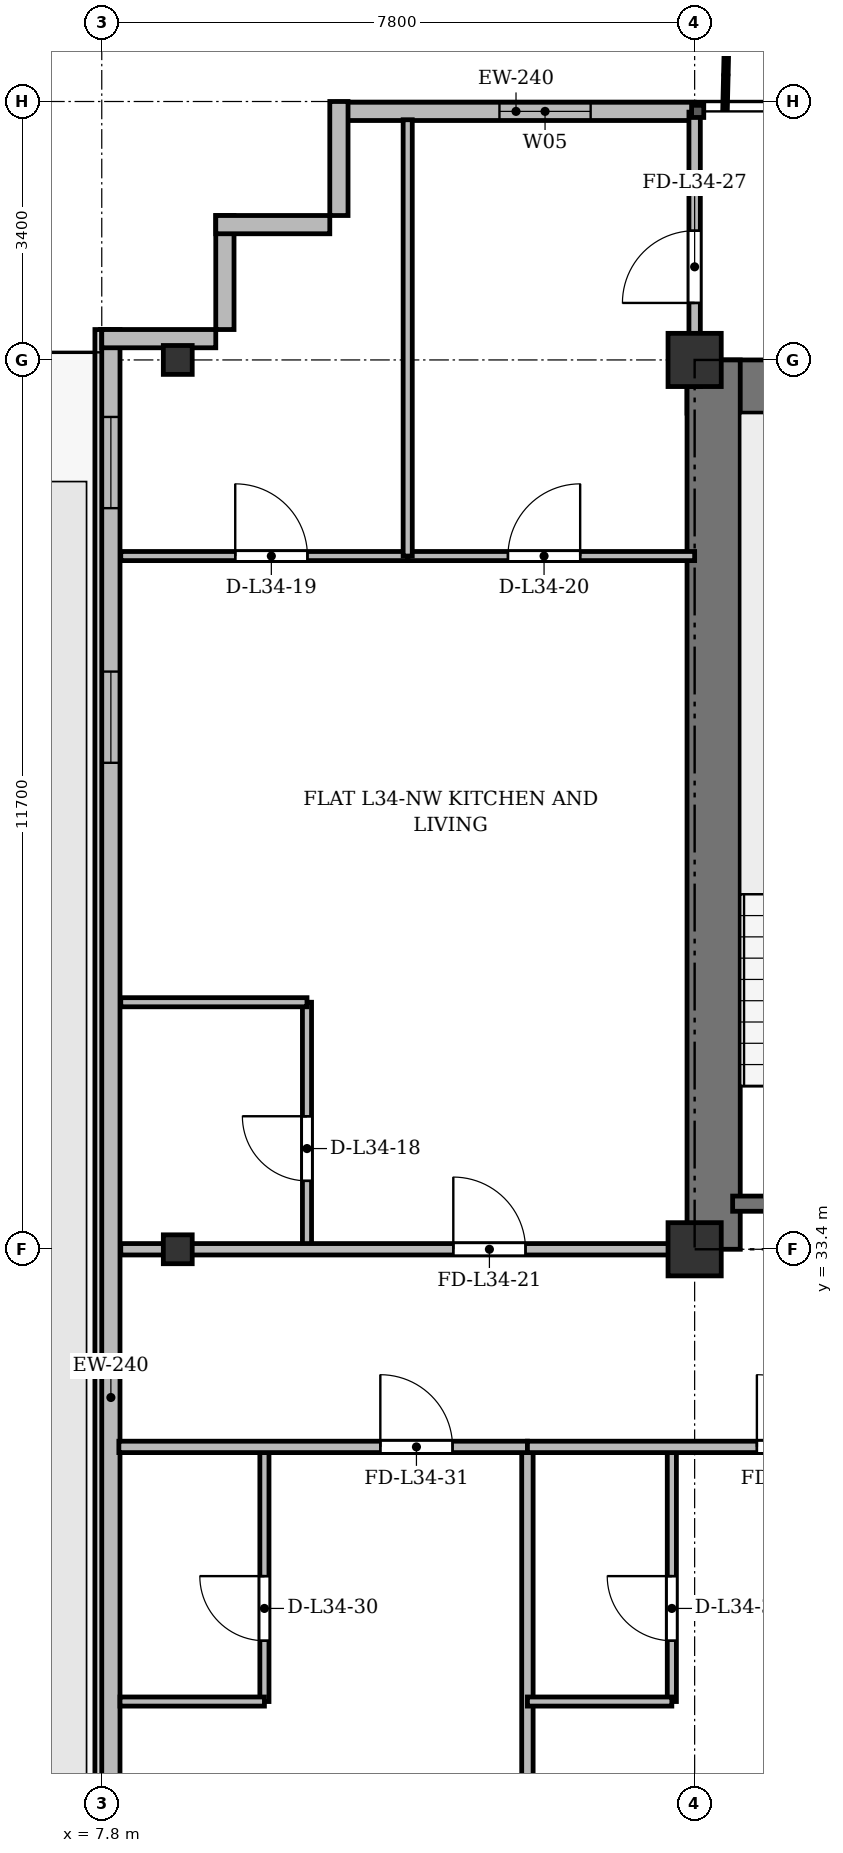
"""IFC4 building model, lengths in metres.
Left out: names, types, materials, properties, quantities, classifications, styles, units other than length and angle.
Written with IfcOpenShell. Run it as: python <this file> out.ifc"""

import sys

from ifc_helpers import new_model, si_unit, direction, frame, frame_2d, origin, origin_2d, place, context, subcontext, project, spatial, rectangle, i_section, extrude, source, transform, mapped, element, fill, save


model = new_model("IFC4")
c1 = context("Model", 3, precision=1e-05, world=origin(), true_north=direction((0.0, 1.0)))
c2 = subcontext(c1, "Body", "Model", "MODEL_VIEW")
j1 = project(units=[si_unit("LENGTHUNIT", "METRE"), si_unit("PLANEANGLEUNIT", "RADIAN")], contexts=[c1])
p1 = place(None, origin())
s1 = spatial("IfcSite", under=j1, at=p1, CompositionType="ELEMENT")
p2 = place(p1, origin())
s2 = spatial("IfcBuilding", under=s1, at=p2, CompositionType="ELEMENT")
p3 = place(p2, frame((0.0, 0.0, 132.1)))
s3 = spatial("IfcBuildingStorey", under=s2, at=p3, CompositionType="ELEMENT", Elevation=132.1)
m1 = source(origin(), c2, "Body", "SweptSolid", [
    extrude(i_section(OverallWidth=0.38, OverallDepth=0.38, WebThickness=0.02, FlangeThickness=0.03, at=origin_2d()), origin(), (0.0, 0.0, 1.0), 3.6),
])
for number, where, z_axis, x_axis in (
    (1, (8.8, 33.4, 0.0), (0.0, 0.0, 1.0), (1.0, 0.0, 0.0)),
    (2, (8.8, 45.1, 0.0), (0.0, 0.0, 1.0), (1.0, 0.0, 0.0)),
):
    element("IfcColumn", number, at=place(p3, frame(where, z_axis=z_axis, x_axis=x_axis)), inside=s3, PredefinedType="COLUMN", context=c2, shape_type="MappedRepresentation", body=[
        mapped(m1, transform((0.0, 0.0, 0.0), x_axis=(1.0, 0.0, 0.0), y_axis=(0.0, 1.0, 0.0), z_axis=(0.0, 0.0, 1.0), scale=1.0)),
    ])
m2 = source(origin(), c2, "Body", "SweptSolid", [
    extrude(rectangle(XDim=0.7, YDim=0.7, at=origin_2d()), origin(), (0.0, 0.0, 1.0), 3.6),
])
for number, where, z_axis, x_axis in (
    (3, (15.6, 33.4, 0.0), (0.0, 0.0, 1.0), (1.0, 0.0, 0.0)),
    (4, (15.6, 45.1, 0.0), (0.0, 0.0, 1.0), (1.0, 0.0, 0.0)),
):
    element("IfcColumn", number, at=place(p3, frame(where, z_axis=z_axis, x_axis=x_axis)), inside=s3, PredefinedType="COLUMN", context=c2, shape_type="MappedRepresentation", body=[
        mapped(m2, transform((0.0, 0.0, 0.0), x_axis=(1.0, 0.0, 0.0), y_axis=(0.0, 1.0, 0.0), z_axis=(0.0, 0.0, 1.0), scale=1.0)),
    ])
p4 = place(p3, frame((10.9, 48.37, 0.0), z_axis=(0.0, 0.0, 1.0), x_axis=(1.0, 0.0, 0.0)))
e5 = element("IfcWall", 5, at=p4, inside=s3, PredefinedType="SOLIDWALL", context=c2, shape_type="SweptSolid", body=[
    extrude(rectangle(XDim=4.7, YDim=0.24, at=frame_2d((2.35, 0.0))), origin(), (0.0, 0.0, 1.0), 3.35),
])
p5 = place(p4, frame((2.132, 0.0, 0.9)))
e6 = element("IfcOpeningElement", 6, at=p5, cuts=e5, PredefinedType="OPENING", context=c2, shape_type="SweptSolid", body=[
    extrude(rectangle(XDim=1.2, YDim=1.65, at=frame_2d((0.6, 0.825))), frame((0.0, 0.13, 0.0), z_axis=(0.0, -1.0, 0.0), x_axis=(1.0, 0.0, 0.0)), (0.0, 0.0, 1.0), 0.26),
])
p6 = place(p3, frame((7.92, 6.3, 0.0), z_axis=(0.0, 0.0, 1.0), x_axis=(0.0, 1.0, 0.0)))
e7 = element("IfcWall", 7, at=p6, inside=s3, PredefinedType="SOLIDWALL", context=c2, shape_type="SweptSolid", body=[
    extrude(rectangle(XDim=39.2, YDim=0.24, at=frame_2d((19.6, 0.0))), origin(), (0.0, 0.0, 1.0), 3.35),
])
p7 = place(p6, frame((9.6, 0.0, 0.0)))
e8 = element("IfcOpeningElement", 8, at=p7, cuts=e7, PredefinedType="OPENING", context=c2, shape_type="SweptSolid", body=[
    extrude(rectangle(XDim=1.2, YDim=2.2, at=frame_2d((0.6, 1.1))), frame((0.0, 0.13, 0.0), z_axis=(0.0, -1.0, 0.0), x_axis=(1.0, 0.0, 0.0)), (0.0, 0.0, 1.0), 0.26),
])
p8 = place(p6, frame((1.45, 0.0, 0.92)))
e9 = element("IfcOpeningElement", 9, at=p8, cuts=e7, PredefinedType="OPENING", context=c2, shape_type="SweptSolid", body=[
    extrude(rectangle(XDim=1.2, YDim=1.65, at=frame_2d((0.6, 0.825))), frame((0.0, 0.13, 0.0), z_axis=(0.0, -1.0, 0.0), x_axis=(1.0, 0.0, 0.0)), (0.0, 0.0, 1.0), 0.26),
])
p9 = place(p6, frame((3.8, 0.0, 0.92)))
e10 = element("IfcOpeningElement", 10, at=p9, cuts=e7, PredefinedType="OPENING", context=c2, shape_type="SweptSolid", body=[
    extrude(rectangle(XDim=2.6, YDim=1.9, at=frame_2d((1.3, 0.95))), frame((0.0, 0.13, 0.0), z_axis=(0.0, -1.0, 0.0), x_axis=(1.0, 0.0, 0.0)), (0.0, 0.0, 1.0), 0.26),
])
p10 = place(p6, frame((15.2, 0.0, 0.92)))
e11 = element("IfcOpeningElement", 11, at=p10, cuts=e7, PredefinedType="OPENING", context=c2, shape_type="SweptSolid", body=[
    extrude(rectangle(XDim=2.6, YDim=1.9, at=frame_2d((1.3, 0.95))), frame((0.0, 0.13, 0.0), z_axis=(0.0, -1.0, 0.0), x_axis=(1.0, 0.0, 0.0)), (0.0, 0.0, 1.0), 0.26),
])
p11 = place(p6, frame((33.5, 0.0, 0.92)))
e12 = element("IfcOpeningElement", 12, at=p11, cuts=e7, PredefinedType="OPENING", context=c2, shape_type="SweptSolid", body=[
    extrude(rectangle(XDim=1.2, YDim=1.65, at=frame_2d((0.6, 0.825))), frame((0.0, 0.13, 0.0), z_axis=(0.0, -1.0, 0.0), x_axis=(1.0, 0.0, 0.0)), (0.0, 0.0, 1.0), 0.26),
])
p12 = place(p6, frame((36.85, 0.0, 0.92)))
e13 = element("IfcOpeningElement", 13, at=p12, cuts=e7, PredefinedType="OPENING", context=c2, shape_type="SweptSolid", body=[
    extrude(rectangle(XDim=1.2, YDim=1.65, at=frame_2d((0.6, 0.825))), frame((0.0, 0.13, 0.0), z_axis=(0.0, -1.0, 0.0), x_axis=(1.0, 0.0, 0.0)), (0.0, 0.0, 1.0), 0.26),
])
for number, where, z_axis, x_axis in (
    (14, (7.8, 45.38, 0.0), (0.0, 0.0, 1.0), (1.0, 0.0, 0.0)),
    (15, (9.42, 45.5, 0.0), (0.0, 0.0, 1.0), (0.0, 1.0, 0.0)),
    (16, (9.3, 46.88, 0.0), (0.0, 0.0, 1.0), (1.0, 0.0, 0.0)),
    (17, (10.92, 47.0, 0.0), (0.0, 0.0, 1.0), (0.0, 1.0, 0.0)),
):
    element("IfcWall", number, at=place(p3, frame(where, z_axis=z_axis, x_axis=x_axis)), inside=s3, PredefinedType="SOLIDWALL", context=c2, shape_type="SweptSolid", body=[
        extrude(rectangle(XDim=1.5, YDim=0.24, at=frame_2d((0.75, 0.0))), origin(), (0.0, 0.0, 1.0), 3.35),
    ])
p13 = place(p3, frame((15.5, 44.75, 0.0), z_axis=(0.0, 0.0, 1.0), x_axis=(1.0, 0.0, 0.0)))
e18 = element("IfcWall", 18, at=p13, inside=s3, PredefinedType="SHEAR", context=c2, shape_type="SweptSolid", body=[
    extrude(rectangle(XDim=43.4, YDim=0.7, at=frame_2d((21.7, 0.0))), origin(), (0.0, 0.0, 1.0), 3.35),
])
p14 = place(p3, frame((15.85, 33.4, 0.0), z_axis=(0.0, 0.0, 1.0), x_axis=(0.0, 1.0, 0.0)))
e19 = element("IfcWall", 19, at=p14, inside=s3, PredefinedType="SHEAR", context=c2, shape_type="SweptSolid", body=[
    extrude(rectangle(XDim=11.7, YDim=0.7, at=frame_2d((5.85, 0.0))), origin(), (0.0, 0.0, 1.0), 3.35),
])
p15 = place(p3, frame((16.1, 34.0, 0.0), z_axis=(0.0, 0.0, 1.0), x_axis=(1.0, 0.0, 0.0)))
e20 = element("IfcWall", 20, at=p15, inside=s3, PredefinedType="SHEAR", context=c2, shape_type="SweptSolid", body=[
    extrude(rectangle(XDim=3.4, YDim=0.2, at=frame_2d((1.7, 0.0))), origin(), (0.0, 0.0, 1.0), 3.35),
])
p16 = place(p3, frame((10.5, 33.4, 0.0), z_axis=(0.0, 0.0, 1.0), x_axis=(0.0, 1.0, 0.0)))
e21 = element("IfcWall", 21, at=p16, inside=s3, PredefinedType="PARTITIONING", context=c2, shape_type="SweptSolid", body=[
    extrude(rectangle(XDim=3.25, YDim=0.12, at=frame_2d((1.625, 0.0))), origin(), (0.0, 0.0, 1.0), 2.75),
])
p17 = place(p16, frame((0.9, 0.0, 0.0)))
e22 = element("IfcOpeningElement", 22, at=p17, cuts=e21, PredefinedType="OPENING", context=c2, shape_type="SweptSolid", body=[
    extrude(rectangle(XDim=0.85, YDim=2.1, at=frame_2d((0.425, 1.05))), frame((0.0, 0.07, 0.0), z_axis=(0.0, -1.0, 0.0), x_axis=(1.0, 0.0, 0.0)), (0.0, 0.0, 1.0), 0.14),
])
p18 = place(p3, frame((8.05, 36.65, 0.0), z_axis=(0.0, 0.0, 1.0), x_axis=(1.0, 0.0, 0.0)))
e23 = element("IfcWall", 23, at=p18, inside=s3, PredefinedType="PARTITIONING", context=c2, shape_type="SweptSolid", body=[
    extrude(rectangle(XDim=2.45, YDim=0.12, at=frame_2d((1.225, 0.0))), origin(), (0.0, 0.0, 1.0), 2.85),
])
p19 = place(p3, frame((8.05, 42.52, 0.0), z_axis=(0.0, 0.0, 1.0), x_axis=(1.0, 0.0, 0.0)))
e24 = element("IfcWall", 24, at=p19, inside=s3, PredefinedType="PARTITIONING", context=c2, shape_type="SweptSolid", body=[
    extrude(rectangle(XDim=3.775, YDim=0.12, at=frame_2d((1.887, 0.0))), origin(), (0.0, 0.0, 1.0), 2.85),
])
p20 = place(p19, frame((1.506, 0.0, 0.0)))
e25 = element("IfcOpeningElement", 25, at=p20, cuts=e24, PredefinedType="OPENING", context=c2, shape_type="SweptSolid", body=[
    extrude(rectangle(XDim=0.95, YDim=2.15, at=frame_2d((0.475, 1.075))), frame((0.0, 0.07, 0.0), z_axis=(0.0, -1.0, 0.0), x_axis=(1.0, 0.0, 0.0)), (0.0, 0.0, 1.0), 0.14),
])
p21 = place(p3, frame((11.825, 42.52, 0.0), z_axis=(0.0, 0.0, 1.0), x_axis=(1.0, 0.0, 0.0)))
e26 = element("IfcWall", 26, at=p21, inside=s3, PredefinedType="PARTITIONING", context=c2, shape_type="SweptSolid", body=[
    extrude(rectangle(XDim=3.775, YDim=0.12, at=frame_2d((1.888, 0.0))), origin(), (0.0, 0.0, 1.0), 2.85),
])
p22 = place(p21, frame((1.319, 0.0, 0.0)))
e27 = element("IfcOpeningElement", 27, at=p22, cuts=e26, PredefinedType="OPENING", context=c2, shape_type="SweptSolid", body=[
    extrude(rectangle(XDim=0.95, YDim=2.15, at=frame_2d((0.475, 1.075))), frame((0.0, 0.07, 0.0), z_axis=(0.0, -1.0, 0.0), x_axis=(1.0, 0.0, 0.0)), (0.0, 0.0, 1.0), 0.14),
])
p23 = place(p3, frame((11.825, 42.52, 0.0), z_axis=(0.0, 0.0, 1.0), x_axis=(0.0, 1.0, 0.0)))
e28 = element("IfcWall", 28, at=p23, inside=s3, PredefinedType="PARTITIONING", context=c2, shape_type="SweptSolid", body=[
    extrude(rectangle(XDim=5.74, YDim=0.12, at=frame_2d((2.87, 0.0))), origin(), (0.0, 0.0, 1.0), 2.75),
])
p24 = place(p3, frame((8.05, 33.4, 0.0), z_axis=(0.0, 0.0, 1.0), x_axis=(1.0, 0.0, 0.0)))
e29 = element("IfcWall", 29, at=p24, inside=s3, PredefinedType="PARTITIONING", context=c2, shape_type="SweptSolid", body=[
    extrude(rectangle(XDim=7.55, YDim=0.15, at=frame_2d((3.775, 0.0))), origin(), (0.0, 0.0, 1.0), 2.75),
])
p25 = place(p24, frame((4.375, 0.0, 0.0)))
e30 = element("IfcOpeningElement", 30, at=p25, cuts=e29, PredefinedType="OPENING", context=c2, shape_type="SweptSolid", body=[
    extrude(rectangle(XDim=0.95, YDim=2.15, at=frame_2d((0.475, 1.075))), frame((0.0, 0.085, 0.0), z_axis=(0.0, -1.0, 0.0), x_axis=(1.0, 0.0, 0.0)), (0.0, 0.0, 1.0), 0.17),
])
p26 = place(p3, frame((15.6, 44.75, 0.0), z_axis=(0.0, 0.0, 1.0), x_axis=(0.0, 1.0, 0.0)))
e31 = element("IfcWall", 31, at=p26, inside=s3, PredefinedType="PARTITIONING", context=c2, shape_type="SweptSolid", body=[
    extrude(rectangle(XDim=3.61, YDim=0.15, at=frame_2d((1.805, 0.0))), origin(), (0.0, 0.0, 1.0), 2.85),
])
p27 = place(p26, frame((1.1, 0.0, 0.0)))
e32 = element("IfcOpeningElement", 32, at=p27, cuts=e31, PredefinedType="OPENING", context=c2, shape_type="SweptSolid", body=[
    extrude(rectangle(XDim=0.95, YDim=2.15, at=frame_2d((0.475, 1.075))), frame((0.0, 0.085, 0.0), z_axis=(0.0, -1.0, 0.0), x_axis=(1.0, 0.0, 0.0)), (0.0, 0.0, 1.0), 0.17),
])
p28 = place(p3, frame((13.4, 3.525, 0.0), z_axis=(0.0, 0.0, 1.0), x_axis=(0.0, 1.0, 0.0)))
e33 = element("IfcWall", 33, at=p28, inside=s3, PredefinedType="PARTITIONING", context=c2, shape_type="SweptSolid", body=[
    extrude(rectangle(XDim=27.275, YDim=0.15, at=frame_2d((13.638, 0.0))), origin(), (0.0, 0.0, 1.0), 2.75),
])
p29 = place(p3, frame((9.94, 27.45, 0.0), z_axis=(0.0, 0.0, 1.0), x_axis=(0.0, 1.0, 0.0)))
e34 = element("IfcWall", 34, at=p29, inside=s3, PredefinedType="PARTITIONING", context=c2, shape_type="SweptSolid", body=[
    extrude(rectangle(XDim=3.35, YDim=0.12, at=frame_2d((1.675, 0.0))), origin(), (0.0, 0.0, 1.0), 3.35),
])
p30 = place(p29, frame((0.8, 0.0, 0.0)))
e35 = element("IfcOpeningElement", 35, at=p30, cuts=e34, PredefinedType="OPENING", context=c2, shape_type="SweptSolid", body=[
    extrude(rectangle(XDim=0.85, YDim=2.1, at=frame_2d((0.425, 1.05))), frame((0.0, 0.07, 0.0), z_axis=(0.0, -1.0, 0.0), x_axis=(1.0, 0.0, 0.0)), (0.0, 0.0, 1.0), 0.14),
])
p31 = place(p3, frame((8.04, 27.45, 0.0), z_axis=(0.0, 0.0, 1.0), x_axis=(1.0, 0.0, 0.0)))
e36 = element("IfcWall", 36, at=p31, inside=s3, PredefinedType="PARTITIONING", context=c2, shape_type="SweptSolid", body=[
    extrude(rectangle(XDim=1.9, YDim=0.12, at=frame_2d((0.95, 0.0))), origin(), (0.0, 0.0, 1.0), 2.85),
])
p32 = place(p3, frame((8.025, 30.8, 0.0), z_axis=(0.0, 0.0, 1.0), x_axis=(1.0, 0.0, 0.0)))
e37 = element("IfcWall", 37, at=p32, inside=s3, PredefinedType="PARTITIONING", context=c2, shape_type="SweptSolid", body=[
    extrude(rectangle(XDim=5.375, YDim=0.15, at=frame_2d((2.688, 0.0))), origin(), (0.0, 0.0, 1.0), 2.85),
])
p33 = place(p32, frame((3.44, 0.0, 0.0)))
e38 = element("IfcOpeningElement", 38, at=p33, cuts=e37, PredefinedType="OPENING", context=c2, shape_type="SweptSolid", body=[
    extrude(rectangle(XDim=0.95, YDim=2.15, at=frame_2d((0.475, 1.075))), frame((0.0, 0.085, 0.0), z_axis=(0.0, -1.0, 0.0), x_axis=(1.0, 0.0, 0.0)), (0.0, 0.0, 1.0), 0.17),
])
p34 = place(p3, frame((15.3, 27.45, 0.0), z_axis=(0.0, 0.0, 1.0), x_axis=(0.0, 1.0, 0.0)))
e39 = element("IfcWall", 39, at=p34, inside=s3, PredefinedType="PARTITIONING", context=c2, shape_type="SweptSolid", body=[
    extrude(rectangle(XDim=3.35, YDim=0.12, at=frame_2d((1.675, 0.0))), origin(), (0.0, 0.0, 1.0), 3.35),
])
p35 = place(p34, frame((0.8, 0.0, 0.0)))
e40 = element("IfcOpeningElement", 40, at=p35, cuts=e39, PredefinedType="OPENING", context=c2, shape_type="SweptSolid", body=[
    extrude(rectangle(XDim=0.85, YDim=2.1, at=frame_2d((0.425, 1.05))), frame((0.0, 0.07, 0.0), z_axis=(0.0, -1.0, 0.0), x_axis=(1.0, 0.0, 0.0)), (0.0, 0.0, 1.0), 0.14),
])
p36 = place(p3, frame((13.4, 27.45, 0.0), z_axis=(0.0, 0.0, 1.0), x_axis=(1.0, 0.0, 0.0)))
e41 = element("IfcWall", 41, at=p36, inside=s3, PredefinedType="PARTITIONING", context=c2, shape_type="SweptSolid", body=[
    extrude(rectangle(XDim=1.9, YDim=0.12, at=frame_2d((0.95, 0.0))), origin(), (0.0, 0.0, 1.0), 3.35),
])
p37 = place(p3, frame((13.4, 30.8, 0.0), z_axis=(0.0, 0.0, 1.0), x_axis=(1.0, 0.0, 0.0)))
e42 = element("IfcWall", 42, at=p37, inside=s3, PredefinedType="PARTITIONING", context=c2, shape_type="SweptSolid", body=[
    extrude(rectangle(XDim=4.8, YDim=0.15, at=frame_2d((2.4, 0.0))), origin(), (0.0, 0.0, 1.0), 2.85),
])
p38 = place(p37, frame((3.019, 0.0, 0.0)))
e43 = element("IfcOpeningElement", 43, at=p38, cuts=e42, PredefinedType="OPENING", context=c2, shape_type="SweptSolid", body=[
    extrude(rectangle(XDim=0.95, YDim=2.15, at=frame_2d((0.475, 1.075))), frame((0.0, 0.085, 0.0), z_axis=(0.0, -1.0, 0.0), x_axis=(1.0, 0.0, 0.0)), (0.0, 0.0, 1.0), 0.17),
])
m3 = source(origin(), c2, "Body", "SweptSolid", [
    extrude(rectangle(XDim=1.2, YDim=1.65, at=frame_2d((0.6, 0.825))), frame((0.0, 0.03, 0.0), z_axis=(0.0, -1.0, 0.0), x_axis=(1.0, 0.0, 0.0)), (0.0, 0.0, 1.0), 0.06),
])
p39 = place(p5, origin())
e44 = element("IfcWindow", 44, at=p39, inside=s3, PartitioningType="SINGLE_PANEL", PredefinedType="WINDOW", context=c2, shape_type="MappedRepresentation", body=[
    mapped(m3, transform((0.0, 0.0, 0.0), x_axis=(1.0, 0.0, 0.0), y_axis=(0.0, 1.0, 0.0), z_axis=(0.0, 0.0, 1.0), scale=1.0)),
])
fill(e6, e44)
p40 = place(p11, origin())
e45 = element("IfcWindow", 45, at=p40, inside=s3, PartitioningType="SINGLE_PANEL", PredefinedType="WINDOW", context=c2, shape_type="MappedRepresentation", body=[
    mapped(m3, transform((0.0, 0.0, 0.0), x_axis=(1.0, 0.0, 0.0), y_axis=(0.0, 1.0, 0.0), z_axis=(0.0, 0.0, 1.0), scale=1.0)),
])
fill(e12, e45)
p41 = place(p12, origin())
e46 = element("IfcWindow", 46, at=p41, inside=s3, PartitioningType="SINGLE_PANEL", PredefinedType="WINDOW", context=c2, shape_type="MappedRepresentation", body=[
    mapped(m3, transform((0.0, 0.0, 0.0), x_axis=(1.0, 0.0, 0.0), y_axis=(0.0, 1.0, 0.0), z_axis=(0.0, 0.0, 1.0), scale=1.0)),
])
fill(e13, e46)
m4 = source(origin(), c2, "Body", "SweptSolid", [
    extrude(rectangle(XDim=0.85, YDim=2.1, at=frame_2d((0.425, 1.05))), frame((0.0, 0.025, 0.0), z_axis=(0.0, -1.0, 0.0), x_axis=(1.0, 0.0, 0.0)), (0.0, 0.0, 1.0), 0.05),
])
p42 = place(p17, origin())
e47 = element("IfcDoor", 47, at=p42, inside=s3, OperationType="SINGLE_SWING_RIGHT", PredefinedType="DOOR", context=c2, shape_type="MappedRepresentation", body=[
    mapped(m4, transform((0.0, 0.0, 0.0), x_axis=(1.0, 0.0, 0.0), y_axis=(0.0, 1.0, 0.0), z_axis=(0.0, 0.0, 1.0), scale=1.0)),
])
fill(e22, e47)
m5 = source(origin(), c2, "Body", "SweptSolid", [
    extrude(rectangle(XDim=0.95, YDim=2.15, at=frame_2d((0.475, 1.075))), frame((0.0, 0.025, 0.0), z_axis=(0.0, -1.0, 0.0), x_axis=(1.0, 0.0, 0.0)), (0.0, 0.0, 1.0), 0.05),
])
p43 = place(p20, origin())
e48 = element("IfcDoor", 48, at=p43, inside=s3, OperationType="SINGLE_SWING_LEFT", PredefinedType="DOOR", context=c2, shape_type="MappedRepresentation", body=[
    mapped(m5, transform((0.0, 0.0, 0.0), x_axis=(1.0, 0.0, 0.0), y_axis=(0.0, 1.0, 0.0), z_axis=(0.0, 0.0, 1.0), scale=1.0)),
])
fill(e25, e48)
p44 = place(p22, origin())
e49 = element("IfcDoor", 49, at=p44, inside=s3, OperationType="SINGLE_SWING_RIGHT", PredefinedType="DOOR", context=c2, shape_type="MappedRepresentation", body=[
    mapped(m5, transform((0.0, 0.0, 0.0), x_axis=(1.0, 0.0, 0.0), y_axis=(0.0, 1.0, 0.0), z_axis=(0.0, 0.0, 1.0), scale=1.0)),
])
fill(e27, e49)
p45 = place(p25, origin())
e50 = element("IfcDoor", 50, at=p45, inside=s3, OperationType="SINGLE_SWING_LEFT", PredefinedType="DOOR", context=c2, shape_type="MappedRepresentation", body=[
    mapped(m5, transform((0.0, 0.0, 0.0), x_axis=(1.0, 0.0, 0.0), y_axis=(0.0, 1.0, 0.0), z_axis=(0.0, 0.0, 1.0), scale=1.0)),
])
fill(e30, e50)
p46 = place(p27, origin())
e51 = element("IfcDoor", 51, at=p46, inside=s3, OperationType="SINGLE_SWING_LEFT", PredefinedType="DOOR", context=c2, shape_type="MappedRepresentation", body=[
    mapped(m5, transform((0.0, 0.0, 0.0), x_axis=(1.0, 0.0, 0.0), y_axis=(0.0, 1.0, 0.0), z_axis=(0.0, 0.0, 1.0), scale=1.0)),
])
fill(e32, e51)
p47 = place(p30, origin())
e52 = element("IfcDoor", 52, at=p47, inside=s3, OperationType="SINGLE_SWING_RIGHT", PredefinedType="DOOR", context=c2, shape_type="MappedRepresentation", body=[
    mapped(m4, transform((0.0, 0.0, 0.0), x_axis=(1.0, 0.0, 0.0), y_axis=(0.0, 1.0, 0.0), z_axis=(0.0, 0.0, 1.0), scale=1.0)),
])
fill(e35, e52)
p48 = place(p33, origin())
e53 = element("IfcDoor", 53, at=p48, inside=s3, OperationType="SINGLE_SWING_LEFT", PredefinedType="DOOR", context=c2, shape_type="MappedRepresentation", body=[
    mapped(m5, transform((0.0, 0.0, 0.0), x_axis=(1.0, 0.0, 0.0), y_axis=(0.0, 1.0, 0.0), z_axis=(0.0, 0.0, 1.0), scale=1.0)),
])
fill(e38, e53)
p49 = place(p35, origin())
e54 = element("IfcDoor", 54, at=p49, inside=s3, OperationType="SINGLE_SWING_RIGHT", PredefinedType="DOOR", context=c2, shape_type="MappedRepresentation", body=[
    mapped(m4, transform((0.0, 0.0, 0.0), x_axis=(1.0, 0.0, 0.0), y_axis=(0.0, 1.0, 0.0), z_axis=(0.0, 0.0, 1.0), scale=1.0)),
])
fill(e40, e54)
p50 = place(p38, origin())
e55 = element("IfcDoor", 55, at=p50, inside=s3, OperationType="SINGLE_SWING_LEFT", PredefinedType="DOOR", context=c2, shape_type="MappedRepresentation", body=[
    mapped(m5, transform((0.0, 0.0, 0.0), x_axis=(1.0, 0.0, 0.0), y_axis=(0.0, 1.0, 0.0), z_axis=(0.0, 0.0, 1.0), scale=1.0)),
])
fill(e43, e55)
save(model, sys.argv[1])
